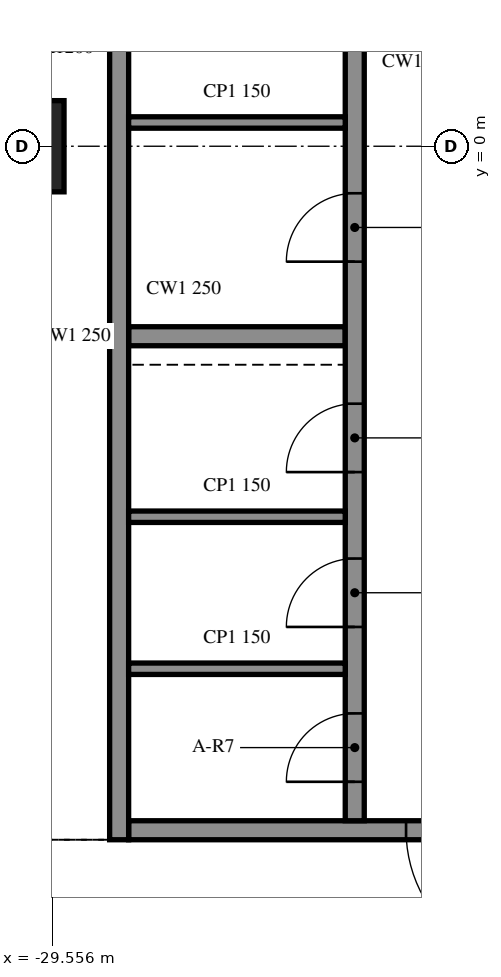
"""IFC4 building model, lengths in metres.
Left out: names, types, materials, properties, quantities, classifications, styles, units other than length and angle.
Written with IfcOpenShell. Run it as: python <this file> out.ifc"""

import sys

from ifc_helpers import new_model, si_unit, direction, frame, frame_2d, origin, origin_2d, place, context, subcontext, project, spatial, rectangle, extrude, element, fill, save


model = new_model("IFC4")
c1 = context("Model", 3, precision=1e-05, world=origin(), true_north=direction((0.0, 1.0)))
c2 = subcontext(c1, "Body", "Model", "MODEL_VIEW")
j1 = project(units=[si_unit("LENGTHUNIT", "METRE"), si_unit("PLANEANGLEUNIT", "RADIAN")], contexts=[c1])
p1 = place(None, origin())
s1 = spatial("IfcSite", under=j1, at=p1, CompositionType="ELEMENT")
p2 = place(p1, origin())
s2 = spatial("IfcBuilding", under=s1, at=p2, CompositionType="ELEMENT")
p3 = place(p2, frame((0.0, 0.0, 189.6)))
s3 = spatial("IfcBuildingStorey", under=s2, at=p3, CompositionType="ELEMENT", Elevation=189.6)
p4 = place(p3, frame((-30.0, 0.0, -0.4), z_axis=(0.0, 0.0, 1.0), x_axis=(1.0, 0.0, 0.0)))
e1 = element("IfcColumn", 1, at=p4, inside=s3, PredefinedType="COLUMN", context=c2, shape_type="SweptSolid", body=[
    extrude(rectangle(XDim=1.2, YDim=1.2, at=origin_2d()), origin(), (0.0, 0.0, 1.0), 4.36),
])
p5 = place(p3, frame((-28.675, 15.125, 0.0), z_axis=(0.0, 0.0, 1.0), x_axis=(0.0, -1.0, 0.0)))
e2 = element("IfcWall", 2, at=p5, inside=s3, PredefinedType="SOLIDWALL", context=c2, shape_type="SweptSolid", body=[
    extrude(rectangle(XDim=24.25, YDim=0.25, at=frame_2d((12.125, 0.0))), origin(), (0.0, 0.0, 1.0), 3.96),
])
p6 = place(p3, frame((-19.45, -9.0, 0.0), z_axis=(0.0, 0.0, 1.0), x_axis=(-1.0, 0.0, 0.0)))
e3 = element("IfcWall", 3, at=p6, inside=s3, PredefinedType="SOLIDWALL", context=c2, shape_type="SweptSolid", body=[
    extrude(rectangle(XDim=9.1, YDim=0.25, at=frame_2d((4.55, 0.0))), origin(), (0.0, 0.0, 1.0), 3.96),
])
p7 = place(p6, frame((3.65, 0.0, 0.0)))
e4 = element("IfcOpeningElement", 4, at=p7, cuts=e3, PredefinedType="OPENING", context=c2, shape_type="SweptSolid", body=[
    extrude(rectangle(XDim=1.8, YDim=2.1, at=frame_2d((0.9, 1.05))), frame((0.0, 0.135, 0.0), z_axis=(0.0, -1.0, 0.0), x_axis=(1.0, 0.0, 0.0)), (0.0, 0.0, 1.0), 0.27),
])
p8 = place(p3, frame((-25.575, -8.875, 0.0), z_axis=(0.0, 0.0, 1.0), x_axis=(0.0, 1.0, 0.0)))
e5 = element("IfcWall", 5, at=p8, inside=s3, PredefinedType="SOLIDWALL", context=c2, shape_type="SweptSolid", body=[
    extrude(rectangle(XDim=17.5, YDim=0.25, at=frame_2d((8.75, 0.0))), origin(), (0.0, 0.0, 1.0), 3.96),
])
p9 = place(p8, frame((7.356, 0.0, 0.0)))
e6 = element("IfcOpeningElement", 6, at=p9, cuts=e5, PredefinedType="OPENING", context=c2, shape_type="SweptSolid", body=[
    extrude(rectangle(XDim=0.9, YDim=2.1, at=frame_2d((0.45, 1.05))), frame((0.0, 0.135, 0.0), z_axis=(0.0, -1.0, 0.0), x_axis=(1.0, 0.0, 0.0)), (0.0, 0.0, 1.0), 0.27),
])
p10 = place(p8, frame((11.425, 0.0, 0.0)))
e7 = element("IfcOpeningElement", 7, at=p10, cuts=e5, PredefinedType="OPENING", context=c2, shape_type="SweptSolid", body=[
    extrude(rectangle(XDim=0.9, YDim=2.1, at=frame_2d((0.45, 1.05))), frame((0.0, 0.135, 0.0), z_axis=(0.0, -1.0, 0.0), x_axis=(1.0, 0.0, 0.0)), (0.0, 0.0, 1.0), 0.27),
])
p11 = place(p8, frame((15.494, 0.0, 0.0)))
e8 = element("IfcOpeningElement", 8, at=p11, cuts=e5, PredefinedType="OPENING", context=c2, shape_type="SweptSolid", body=[
    extrude(rectangle(XDim=0.9, YDim=2.1, at=frame_2d((0.45, 1.05))), frame((0.0, 0.135, 0.0), z_axis=(0.0, -1.0, 0.0), x_axis=(1.0, 0.0, 0.0)), (0.0, 0.0, 1.0), 0.27),
])
p12 = place(p8, frame((0.512, 0.0, 0.0)))
e9 = element("IfcOpeningElement", 9, at=p12, cuts=e5, PredefinedType="OPENING", context=c2, shape_type="SweptSolid", body=[
    extrude(rectangle(XDim=0.9, YDim=2.1, at=frame_2d((0.45, 1.05))), frame((0.0, 0.135, 0.0), z_axis=(0.0, -1.0, 0.0), x_axis=(1.0, 0.0, 0.0)), (0.0, 0.0, 1.0), 0.27),
])
p13 = place(p8, frame((2.55, 0.0, 0.0)))
e10 = element("IfcOpeningElement", 10, at=p13, cuts=e5, PredefinedType="OPENING", context=c2, shape_type="SweptSolid", body=[
    extrude(rectangle(XDim=0.9, YDim=2.1, at=frame_2d((0.45, 1.05))), frame((0.0, 0.135, 0.0), z_axis=(0.0, -1.0, 0.0), x_axis=(1.0, 0.0, 0.0)), (0.0, 0.0, 1.0), 0.27),
])
p14 = place(p8, frame((4.587, 0.0, 0.0)))
e11 = element("IfcOpeningElement", 11, at=p14, cuts=e5, PredefinedType="OPENING", context=c2, shape_type="SweptSolid", body=[
    extrude(rectangle(XDim=0.9, YDim=2.1, at=frame_2d((0.45, 1.05))), frame((0.0, 0.135, 0.0), z_axis=(0.0, -1.0, 0.0), x_axis=(1.0, 0.0, 0.0)), (0.0, 0.0, 1.0), 0.27),
])
p15 = place(p3, frame((-28.55, -2.5, 0.0), z_axis=(0.0, 0.0, 1.0), x_axis=(1.0, 0.0, 0.0)))
e12 = element("IfcWall", 12, at=p15, inside=s3, PredefinedType="SOLIDWALL", context=c2, shape_type="SweptSolid", body=[
    extrude(rectangle(XDim=2.85, YDim=0.25, at=frame_2d((1.425, 0.0))), origin(), (0.0, 0.0, 1.0), 3.96),
])
for number, where, z_axis, x_axis in (
    (13, (-28.55, 0.312, 0.0), (0.0, 0.0, 1.0), (1.0, 0.0, 0.0)),
    (14, (-28.55, -6.875, 0.0), (0.0, 0.0, 1.0), (1.0, 0.0, 0.0)),
    (15, (-28.55, -4.875, 0.0), (0.0, 0.0, 1.0), (1.0, 0.0, 0.0)),
):
    element("IfcWall", number, at=place(p3, frame(where, z_axis=z_axis, x_axis=x_axis)), inside=s3, PredefinedType="PARTITIONING", context=c2, shape_type="SweptSolid", body=[
        extrude(rectangle(XDim=2.85, YDim=0.15, at=frame_2d((1.425, 0.0))), origin(), (0.0, 0.0, 1.0), 3.96),
    ])
p16 = place(p7, origin())
e16 = element("IfcDoor", 16, at=p16, inside=s3, OperationType="DOUBLE_DOOR_SINGLE_SWING", PredefinedType="DOOR", context=c2, shape_type="SweptSolid", body=[
    extrude(rectangle(XDim=1.8, YDim=2.1, at=frame_2d((0.9, 1.05))), frame((0.0, 0.025, 0.0), z_axis=(0.0, -1.0, 0.0), x_axis=(1.0, 0.0, 0.0)), (0.0, 0.0, 1.0), 0.05),
])
fill(e4, e16)
p17 = place(p9, origin())
e17 = element("IfcDoor", 17, at=p17, inside=s3, OperationType="SINGLE_SWING_LEFT", PredefinedType="DOOR", context=c2, shape_type="SweptSolid", body=[
    extrude(rectangle(XDim=0.9, YDim=2.1, at=frame_2d((0.45, 1.05))), frame((0.0, 0.025, 0.0), z_axis=(0.0, -1.0, 0.0), x_axis=(1.0, 0.0, 0.0)), (0.0, 0.0, 1.0), 0.05),
])
fill(e6, e17)
p18 = place(p12, origin())
e18 = element("IfcDoor", 18, at=p18, inside=s3, OperationType="SINGLE_SWING_LEFT", PredefinedType="DOOR", context=c2, shape_type="SweptSolid", body=[
    extrude(rectangle(XDim=0.9, YDim=2.1, at=frame_2d((0.45, 1.05))), frame((0.0, 0.025, 0.0), z_axis=(0.0, -1.0, 0.0), x_axis=(1.0, 0.0, 0.0)), (0.0, 0.0, 1.0), 0.05),
])
fill(e9, e18)
p19 = place(p13, origin())
e19 = element("IfcDoor", 19, at=p19, inside=s3, OperationType="SINGLE_SWING_RIGHT", PredefinedType="DOOR", context=c2, shape_type="SweptSolid", body=[
    extrude(rectangle(XDim=0.9, YDim=2.1, at=frame_2d((0.45, 1.05))), frame((0.0, 0.025, 0.0), z_axis=(0.0, -1.0, 0.0), x_axis=(1.0, 0.0, 0.0)), (0.0, 0.0, 1.0), 0.05),
])
fill(e10, e19)
p20 = place(p14, origin())
e20 = element("IfcDoor", 20, at=p20, inside=s3, OperationType="SINGLE_SWING_LEFT", PredefinedType="DOOR", context=c2, shape_type="SweptSolid", body=[
    extrude(rectangle(XDim=0.9, YDim=2.1, at=frame_2d((0.45, 1.05))), frame((0.0, 0.025, 0.0), z_axis=(0.0, -1.0, 0.0), x_axis=(1.0, 0.0, 0.0)), (0.0, 0.0, 1.0), 0.05),
])
fill(e11, e20)
save(model, sys.argv[1])
